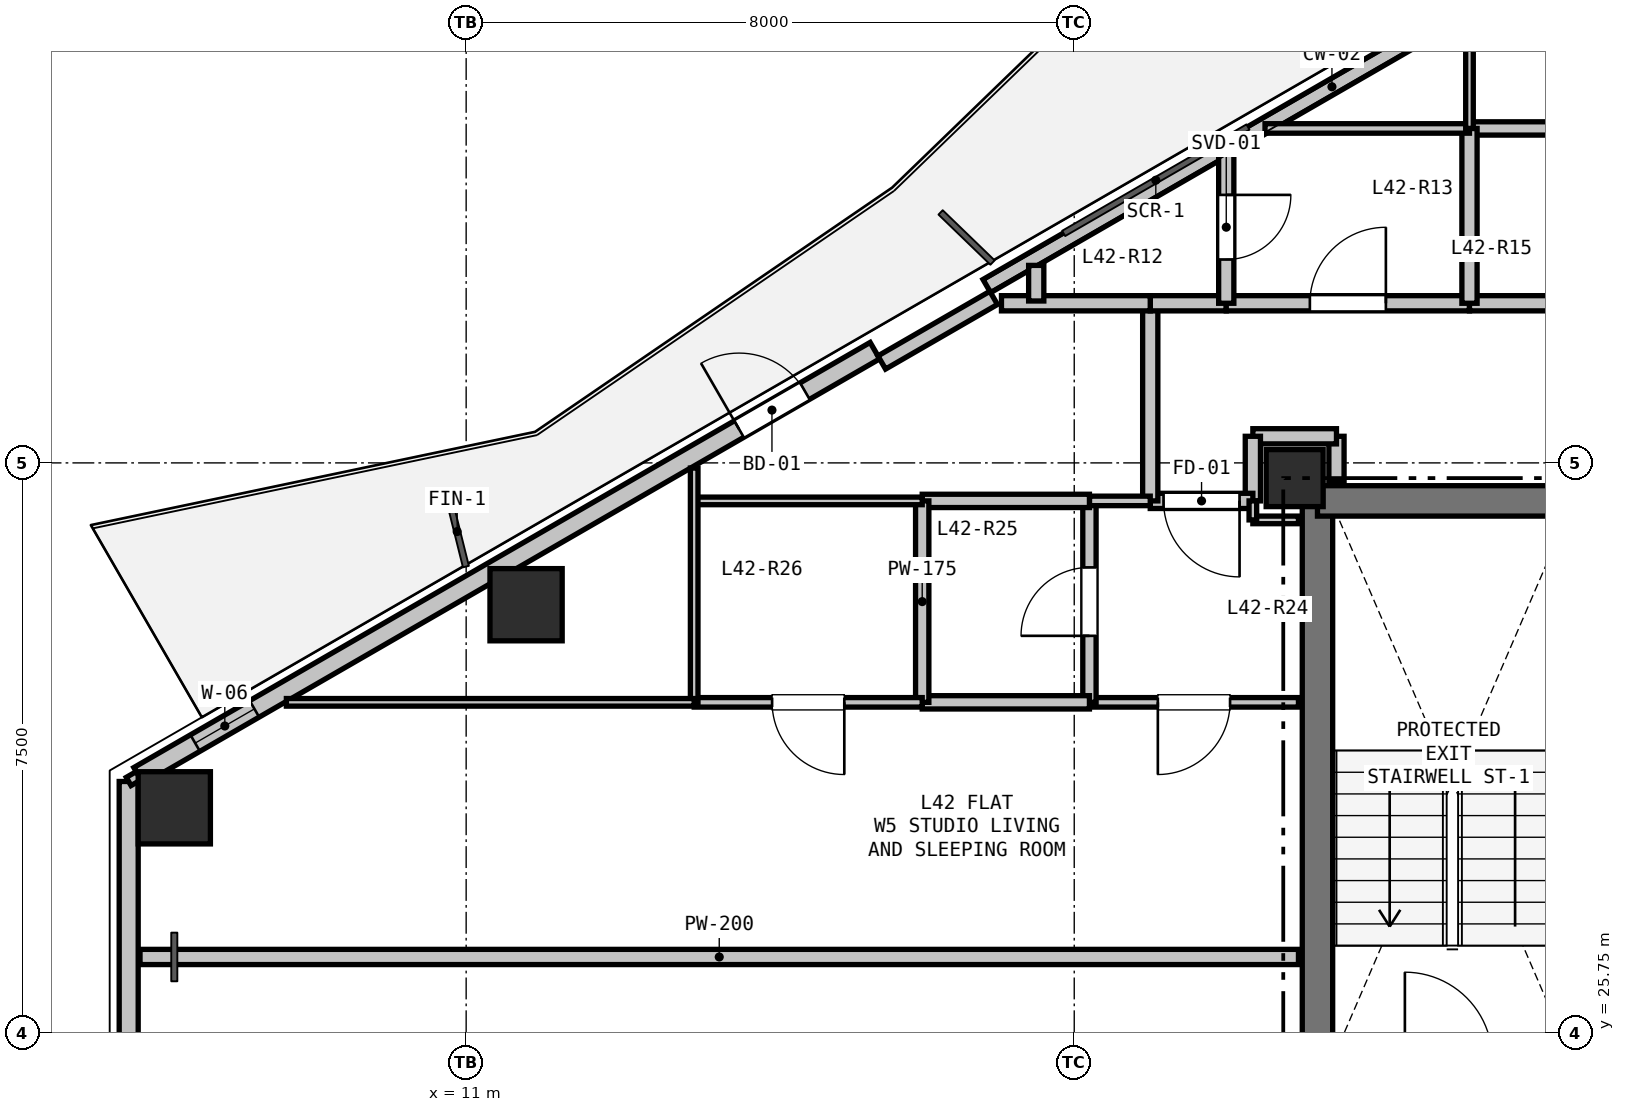
"""IFC4 building model, lengths in metres.
Left out: names, types, materials, properties, quantities, classifications, styles, units other than length and angle.
Written with IfcOpenShell. Run it as: python <this file> out.ifc"""

import sys

from ifc_helpers import new_model, si_unit, direction, frame, frame_2d, origin, origin_2d, place, context, subcontext, project, spatial, rectangle, hollow_rectangle, extrude, element, fill, save


model = new_model("IFC4")
c1 = context("Model", 3, precision=1e-05, world=origin(), true_north=direction((0.0, 1.0)))
c2 = subcontext(c1, "Body", "Model", "MODEL_VIEW")
j1 = project(units=[si_unit("LENGTHUNIT", "METRE"), si_unit("PLANEANGLEUNIT", "RADIAN")], contexts=[c1])
p1 = place(None, origin())
s1 = spatial("IfcSite", under=j1, at=p1, CompositionType="ELEMENT")
p2 = place(p1, origin())
s2 = spatial("IfcBuilding", under=s1, at=p2, CompositionType="ELEMENT")
p3 = place(p2, frame((0.0, 0.0, 150.9)))
s3 = spatial("IfcBuildingStorey", under=s2, at=p3, CompositionType="ELEMENT", Elevation=150.9)
p4 = place(p3, frame((21.9, 33.05, 0.0), z_axis=(0.0, 0.0, 1.0), x_axis=(1.0, 0.0, 0.0)))
e1 = element("IfcColumn", 1, at=p4, inside=s3, PredefinedType="COLUMN", context=c2, shape_type="SweptSolid", body=[
    extrude(rectangle(XDim=0.75, YDim=0.75, at=origin_2d()), origin(), (0.0, 0.0, 1.0), 3.3),
])
for number, where, z_axis, x_axis in (
    (2, (7.16, 28.712, 0.0), (0.0, 0.0, 1.0), (1.0, 0.0, 0.0)),
    (3, (11.788, 31.384, 0.0), (0.0, 0.0, 1.0), (1.0, 0.0, 0.0)),
):
    element("IfcColumn", number, at=place(p3, frame(where, z_axis=z_axis, x_axis=x_axis)), inside=s3, PredefinedType="COLUMN", context=c2, shape_type="SweptSolid", body=[
        extrude(hollow_rectangle(XDim=0.95, YDim=0.95, WallThickness=0.028, at=origin_2d()), origin(), (0.0, 0.0, 1.0), 3.3),
    ])
p5 = place(p3, frame((6.56, 24.441, 0.0), z_axis=(0.0, 0.0, 1.0), x_axis=(0.0, 1.0, 0.0)))
e4 = element("IfcWall", 4, at=p5, inside=s3, PredefinedType="SOLIDWALL", context=c2, shape_type="SweptSolid", body=[
    extrude(rectangle(XDim=4.617, YDim=0.25, at=frame_2d((2.309, 0.0))), origin(), (0.0, 0.0, 1.0), 2.68),
])
p6 = place(p3, frame((6.69, 29.134, 0.0), z_axis=(0.0, 0.0, 1.0), x_axis=(0.866027848477, 0.499995765644, 0.0)))
e5 = element("IfcWall", 5, at=p6, inside=s3, PredefinedType="SOLIDWALL", context=c2, shape_type="SweptSolid", body=[
    extrude(rectangle(XDim=11.186, YDim=0.25, at=frame_2d((5.593, 0.0))), origin(), (0.0, 0.0, 1.0), 2.68),
])
p7 = place(p6, frame((9.122, 0.0, 0.0)))
e6 = element("IfcOpeningElement", 6, at=p7, cuts=e5, PredefinedType="OPENING", context=c2, shape_type="SweptSolid", body=[
    extrude(rectangle(XDim=1.0, YDim=2.1, at=frame_2d((0.5, 1.05))), frame((0.0, 0.135, 0.0), z_axis=(0.0, -1.0, 0.0), x_axis=(1.0, 0.0, 0.0)), (0.0, 0.0, 1.0), 0.27),
])
p8 = place(p6, frame((0.86, 0.0, 0.9)))
e7 = element("IfcOpeningElement", 7, at=p8, cuts=e5, PredefinedType="OPENING", context=c2, shape_type="SweptSolid", body=[
    extrude(rectangle(XDim=0.9, YDim=1.4, at=frame_2d((0.45, 0.7))), frame((0.0, 0.135, 0.0), z_axis=(0.0, -1.0, 0.0), x_axis=(1.0, 0.0, 0.0)), (0.0, 0.0, 1.0), 0.27),
])
p9 = place(p3, frame((17.85, 35.577, 0.0), z_axis=(0.0, 0.0, 1.0), x_axis=(0.866026619769, 0.499997893847, 0.0)))
e8 = element("IfcWall", 8, at=p9, inside=s3, PredefinedType="PARAPET", context=c2, shape_type="SweptSolid", body=[
    extrude(rectangle(XDim=10.486, YDim=0.2, at=frame_2d((5.243, 0.0))), origin(), (0.0, 0.0, 1.0), 0.2),
])
p10 = place(p3, frame((16.468, 34.571, 0.0), z_axis=(0.0, 0.0, 1.0), x_axis=(0.865989465428, 0.500062241894, 0.0)))
e9 = element("IfcWall", 9, at=p10, inside=s3, PredefinedType="PARAPET", context=c2, shape_type="SweptSolid", body=[
    extrude(rectangle(XDim=1.7, YDim=0.2, at=frame_2d((0.85, 0.0))), origin(), (0.0, 0.0, 1.0), 2.68),
])
p11 = place(p3, frame((22.2, 25.4, 0.0), z_axis=(0.0, 0.0, 1.0), x_axis=(0.0, 1.0, 0.0)))
e10 = element("IfcWall", 10, at=p11, inside=s3, PredefinedType="SHEAR", context=c2, shape_type="SweptSolid", body=[
    extrude(rectangle(XDim=7.35, YDim=0.4, at=frame_2d((3.675, 0.0))), origin(), (0.0, 0.0, 1.0), 3.06),
])
p12 = place(p3, frame((22.2, 32.75, 0.0), z_axis=(0.0, 0.0, 1.0), x_axis=(1.0, 0.0, 0.0)))
e11 = element("IfcWall", 11, at=p12, inside=s3, PredefinedType="SHEAR", context=c2, shape_type="SweptSolid", body=[
    extrude(rectangle(XDim=3.45, YDim=0.4, at=frame_2d((1.725, 0.0))), origin(), (0.0, 0.0, 1.0), 3.06),
])
p13 = place(p3, frame((22.45, 33.0, 0.0), z_axis=(0.0, 0.0, 1.0), x_axis=(0.0, 1.0, 0.0)))
e12 = element("IfcWall", 12, at=p13, inside=s3, PredefinedType="PARTITIONING", context=c2, shape_type="SweptSolid", body=[
    extrude(rectangle(XDim=0.6, YDim=0.2, at=frame_2d((0.3, 0.0))), origin(), (0.0, 0.0, 1.0), 2.585),
])
p14 = place(p3, frame((22.45, 33.6, 0.0), z_axis=(0.0, 0.0, 1.0), x_axis=(-1.0, 0.0, 0.0)))
e13 = element("IfcWall", 13, at=p14, inside=s3, PredefinedType="PARTITIONING", context=c2, shape_type="SweptSolid", body=[
    extrude(rectangle(XDim=1.1, YDim=0.2, at=frame_2d((0.55, 0.0))), origin(), (0.0, 0.0, 1.0), 3.06),
])
p15 = place(p3, frame((21.35, 33.6, 0.0), z_axis=(0.0, 0.0, 1.0), x_axis=(0.0, -1.0, 0.0)))
e14 = element("IfcWall", 14, at=p15, inside=s3, PredefinedType="PARTITIONING", context=c2, shape_type="SweptSolid", body=[
    extrude(rectangle(XDim=0.85, YDim=0.2, at=frame_2d((0.425, 0.0))), origin(), (0.0, 0.0, 1.0), 2.433),
])
p16 = place(p3, frame((21.35, 32.75, 0.0), z_axis=(0.0, 0.0, 1.0), x_axis=(-1.0, 0.0, 0.0)))
e15 = element("IfcWall", 15, at=p16, inside=s3, PredefinedType="PARTITIONING", context=c2, shape_type="SweptSolid", body=[
    extrude(rectangle(XDim=1.35, YDim=0.2, at=frame_2d((0.675, 0.0))), origin(), (0.0, 0.0, 1.0), 2.433),
])
p17 = place(p16, frame((0.175, 0.0, 0.0)))
e16 = element("IfcOpeningElement", 16, at=p17, cuts=e15, PredefinedType="OPENING", context=c2, shape_type="SweptSolid", body=[
    extrude(rectangle(XDim=1.0, YDim=2.15, at=frame_2d((0.5, 1.075))), frame((0.0, 0.11, 0.0), z_axis=(0.0, -1.0, 0.0), x_axis=(1.0, 0.0, 0.0)), (0.0, 0.0, 1.0), 0.22),
])
p18 = place(p3, frame((20.0, 32.75, 0.0), z_axis=(0.0, 0.0, 1.0), x_axis=(0.0, 1.0, 0.0)))
e17 = element("IfcWall", 17, at=p18, inside=s3, PredefinedType="PARTITIONING", context=c2, shape_type="SweptSolid", body=[
    extrude(rectangle(XDim=2.6, YDim=0.2, at=frame_2d((1.3, 0.0))), origin(), (0.0, 0.0, 1.0), 2.433),
])
p19 = place(p3, frame((20.0, 35.35, 0.0), z_axis=(0.0, 0.0, 1.0), x_axis=(1.0, 0.0, 0.0)))
e18 = element("IfcWall", 18, at=p19, inside=s3, PredefinedType="PARTITIONING", context=c2, shape_type="SweptSolid", body=[
    extrude(rectangle(XDim=1.0, YDim=0.2, at=frame_2d((0.5, 0.0))), origin(), (0.0, 0.0, 1.0), 3.06),
])
p20 = place(p3, frame((21.0, 35.35, 0.0), z_axis=(0.0, 0.0, 1.0), x_axis=(1.0, 0.0, 0.0)))
e19 = element("IfcWall", 19, at=p20, inside=s3, PredefinedType="PARTITIONING", context=c2, shape_type="SweptSolid", body=[
    extrude(rectangle(XDim=3.2, YDim=0.2, at=frame_2d((1.6, 0.0))), origin(), (0.0, 0.0, 1.0), 3.06),
])
p21 = place(p20, frame((1.1, 0.0, 0.0)))
e20 = element("IfcOpeningElement", 20, at=p21, cuts=e19, PredefinedType="OPENING", context=c2, shape_type="SweptSolid", body=[
    extrude(rectangle(XDim=1.0, YDim=2.15, at=frame_2d((0.5, 1.075))), frame((0.0, 0.11, 0.0), z_axis=(0.0, -1.0, 0.0), x_axis=(1.0, 0.0, 0.0)), (0.0, 0.0, 1.0), 0.22),
])
p22 = place(p3, frame((24.2, 35.35, 0.0), z_axis=(0.0, 0.0, 1.0), x_axis=(1.0, 0.0, 0.0)))
e21 = element("IfcWall", 21, at=p22, inside=s3, PredefinedType="PARTITIONING", context=c2, shape_type="SweptSolid", body=[
    extrude(rectangle(XDim=2.2, YDim=0.2, at=frame_2d((1.1, 0.0))), origin(), (0.0, 0.0, 1.0), 3.06),
])
p23 = place(p3, frame((21.35, 32.5, 0.0), z_axis=(0.0, 0.0, 1.0), x_axis=(1.0, 0.0, 0.0)))
e22 = element("IfcWall", 22, at=p23, inside=s3, PredefinedType="PARTITIONING", context=c2, shape_type="SweptSolid", body=[
    extrude(rectangle(XDim=0.6, YDim=0.1, at=frame_2d((0.3, 0.0))), origin(), (0.0, 0.0, 1.0), 2.585),
])
p24 = place(p3, frame((21.95, 30.1, 0.0), z_axis=(0.0, 0.0, 1.0), x_axis=(-1.0, 0.0, 0.0)))
e23 = element("IfcWall", 23, at=p24, inside=s3, PredefinedType="PARTITIONING", context=c2, shape_type="SweptSolid", body=[
    extrude(rectangle(XDim=2.75, YDim=0.125, at=frame_2d((1.375, 0.0))), origin(), (0.0, 0.0, 1.0), 2.585),
])
p25 = place(p24, frame((0.9, 0.0, 0.0)))
e24 = element("IfcOpeningElement", 24, at=p25, cuts=e23, PredefinedType="OPENING", context=c2, shape_type="SweptSolid", body=[
    extrude(rectangle(XDim=0.95, YDim=2.1, at=frame_2d((0.475, 1.05))), frame((0.0, 0.073, 0.0), z_axis=(0.0, -1.0, 0.0), x_axis=(1.0, 0.0, 0.0)), (0.0, 0.0, 1.0), 0.145),
])
p26 = place(p3, frame((19.2, 30.1, 0.0), z_axis=(0.0, 0.0, 1.0), x_axis=(0.0, 1.0, 0.0)))
e25 = element("IfcWall", 25, at=p26, inside=s3, PredefinedType="PLUMBINGWALL", context=c2, shape_type="SweptSolid", body=[
    extrude(rectangle(XDim=2.65, YDim=0.175, at=frame_2d((1.325, 0.0))), origin(), (0.0, 0.0, 1.0), 2.433),
])
p27 = place(p26, frame((0.875, 0.0, 0.0)))
e26 = element("IfcOpeningElement", 26, at=p27, cuts=e25, PredefinedType="OPENING", context=c2, shape_type="SweptSolid", body=[
    extrude(rectangle(XDim=0.9, YDim=2.1, at=frame_2d((0.45, 1.05))), frame((0.0, 0.097, 0.0), z_axis=(0.0, -1.0, 0.0), x_axis=(1.0, 0.0, 0.0)), (0.0, 0.0, 1.0), 0.195),
])
p28 = place(p3, frame((19.2, 32.75, 0.0), z_axis=(0.0, 0.0, 1.0), x_axis=(1.0, 0.0, 0.0)))
e27 = element("IfcWall", 27, at=p28, inside=s3, PredefinedType="PARTITIONING", context=c2, shape_type="SweptSolid", body=[
    extrude(rectangle(XDim=0.8, YDim=0.125, at=frame_2d((0.4, 0.0))), origin(), (0.0, 0.0, 1.0), 2.433),
])
p29 = place(p3, frame((21.35, 32.75, 0.0), z_axis=(0.0, 0.0, 1.0), x_axis=(0.0, -1.0, 0.0)))
e28 = element("IfcWall", 28, at=p29, inside=s3, PredefinedType="PARTITIONING", context=c2, shape_type="SweptSolid", body=[
    extrude(rectangle(XDim=0.25, YDim=0.1, at=frame_2d((0.125, 0.0))), origin(), (0.0, 0.0, 1.0), 3.06),
])
p30 = place(p3, frame((24.2, 37.65, 0.0), z_axis=(0.0, 0.0, 1.0), x_axis=(1.0, 0.0, 0.0)))
e29 = element("IfcWall", 29, at=p30, inside=s3, PredefinedType="PLUMBINGWALL", context=c2, shape_type="SweptSolid", body=[
    extrude(rectangle(XDim=2.2, YDim=0.175, at=frame_2d((1.1, 0.0))), origin(), (0.0, 0.0, 1.0), 3.06),
])
p31 = place(p3, frame((24.2, 35.35, 0.0), z_axis=(0.0, 0.0, 1.0), x_axis=(0.0, 1.0, 0.0)))
e30 = element("IfcWall", 30, at=p31, inside=s3, PredefinedType="PARTITIONING", context=c2, shape_type="SweptSolid", body=[
    extrude(rectangle(XDim=2.3, YDim=0.2, at=frame_2d((1.15, 0.0))), origin(), (0.0, 0.0, 1.0), 3.06),
])
p32 = place(p3, frame((17.0, 32.75, 0.0), z_axis=(0.0, 0.0, 1.0), x_axis=(1.0, 0.0, 0.0)))
e31 = element("IfcWall", 31, at=p32, inside=s3, PredefinedType="PLUMBINGWALL", context=c2, shape_type="SweptSolid", body=[
    extrude(rectangle(XDim=2.2, YDim=0.175, at=frame_2d((1.1, 0.0))), origin(), (0.0, 0.0, 1.0), 2.433),
])
p33 = place(p3, frame((19.2, 30.1, 0.0), z_axis=(0.0, 0.0, 1.0), x_axis=(-1.0, 0.0, 0.0)))
e32 = element("IfcWall", 32, at=p33, inside=s3, PredefinedType="PLUMBINGWALL", context=c2, shape_type="SweptSolid", body=[
    extrude(rectangle(XDim=2.2, YDim=0.175, at=frame_2d((1.1, 0.0))), origin(), (0.0, 0.0, 1.0), 3.06),
])
p34 = place(p3, frame((17.0, 30.1, 0.0), z_axis=(0.0, 0.0, 1.0), x_axis=(0.0, 1.0, 0.0)))
e33 = element("IfcWall", 33, at=p34, inside=s3, PredefinedType="PLUMBINGWALL", context=c2, shape_type="SweptSolid", body=[
    extrude(rectangle(XDim=2.65, YDim=0.175, at=frame_2d((1.325, 0.0))), origin(), (0.0, 0.0, 1.0), 2.433),
])
p35 = place(p3, frame((14.0, 32.75, 0.0), z_axis=(0.0, 0.0, 1.0), x_axis=(1.0, 0.0, 0.0)))
e34 = element("IfcWall", 34, at=p35, inside=s3, PredefinedType="PARTITIONING", context=c2, shape_type="SweptSolid", body=[
    extrude(rectangle(XDim=3.0, YDim=0.1, at=frame_2d((1.5, 0.0))), origin(), (0.0, 0.0, 1.0), 2.365),
])
p36 = place(p3, frame((17.0, 30.1, 0.0), z_axis=(0.0, 0.0, 1.0), x_axis=(-1.0, 0.0, 0.0)))
e35 = element("IfcWall", 35, at=p36, inside=s3, PredefinedType="PARTITIONING", context=c2, shape_type="SweptSolid", body=[
    extrude(rectangle(XDim=3.0, YDim=0.125, at=frame_2d((1.5, 0.0))), origin(), (0.0, 0.0, 1.0), 3.06),
])
p37 = place(p36, frame((1.025, 0.0, 0.0)))
e36 = element("IfcOpeningElement", 36, at=p37, cuts=e35, PredefinedType="OPENING", context=c2, shape_type="SweptSolid", body=[
    extrude(rectangle(XDim=0.95, YDim=2.1, at=frame_2d((0.475, 1.05))), frame((0.0, 0.073, 0.0), z_axis=(0.0, -1.0, 0.0), x_axis=(1.0, 0.0, 0.0)), (0.0, 0.0, 1.0), 0.145),
])
p38 = place(p3, frame((14.0, 30.1, 0.0), z_axis=(0.0, 0.0, 1.0), x_axis=(0.0, 1.0, 0.0)))
e37 = element("IfcWall", 37, at=p38, inside=s3, PredefinedType="PARTITIONING", context=c2, shape_type="SweptSolid", body=[
    extrude(rectangle(XDim=3.082, YDim=0.1, at=frame_2d((1.541, 0.0))), origin(), (0.0, 0.0, 1.0), 2.365),
])
p39 = place(p3, frame((6.709, 26.75, 0.0), z_axis=(0.0, 0.0, 1.0), x_axis=(1.0, 0.0, 0.0)))
e38 = element("IfcWall", 38, at=p39, inside=s3, PredefinedType="PARTITIONING", context=c2, shape_type="SweptSolid", body=[
    extrude(rectangle(XDim=15.241, YDim=0.2, at=frame_2d((7.62, 0.0))), origin(), (0.0, 0.0, 1.0), 2.585),
])
p40 = place(p3, frame((20.0, 35.35, 0.0), z_axis=(0.0, 0.0, 1.0), x_axis=(-1.0, 0.0, 0.0)))
e39 = element("IfcWall", 39, at=p40, inside=s3, PredefinedType="PARTITIONING", context=c2, shape_type="SweptSolid", body=[
    extrude(rectangle(XDim=1.958, YDim=0.2, at=frame_2d((0.979, 0.0))), origin(), (0.0, 0.0, 1.0), 2.365),
])
p41 = place(p3, frame((18.5, 35.38, 0.0), z_axis=(0.0, 0.0, 1.0), x_axis=(0.0, 1.0, 0.0)))
e40 = element("IfcWall", 40, at=p41, inside=s3, PredefinedType="PARTITIONING", context=c2, shape_type="SweptSolid", body=[
    extrude(rectangle(XDim=0.468, YDim=0.2, at=frame_2d((0.234, 0.0))), origin(), (0.0, 0.0, 1.0), 2.365),
])
p42 = place(p3, frame((21.0, 37.352, 0.0), z_axis=(0.0, 0.0, 1.0), x_axis=(0.0, -1.0, 0.0)))
e41 = element("IfcWall", 41, at=p42, inside=s3, PredefinedType="PARTITIONING", context=c2, shape_type="SweptSolid", body=[
    extrude(rectangle(XDim=2.001, YDim=0.2, at=frame_2d((1.001, 0.0))), origin(), (0.0, 0.0, 1.0), 2.365),
])
p43 = place(p42, frame((0.576, 0.0, 0.0)))
e42 = element("IfcOpeningElement", 42, at=p43, cuts=e41, PredefinedType="OPENING", context=c2, shape_type="SweptSolid", body=[
    extrude(rectangle(XDim=0.85, YDim=2.1, at=frame_2d((0.425, 1.05))), frame((0.0, 0.11, 0.0), z_axis=(0.0, -1.0, 0.0), x_axis=(1.0, 0.0, 0.0)), (0.0, 0.0, 1.0), 0.22),
])
p44 = place(p3, frame((21.51, 37.65, 0.0), z_axis=(0.0, 0.0, 1.0), x_axis=(1.0, 0.0, 0.0)))
e43 = element("IfcWall", 43, at=p44, inside=s3, PredefinedType="PARTITIONING", context=c2, shape_type="SweptSolid", body=[
    extrude(rectangle(XDim=2.69, YDim=0.125, at=frame_2d((1.345, 0.0))), origin(), (0.0, 0.0, 1.0), 2.365),
])
p45 = place(p3, frame((24.2, 37.65, 0.0), z_axis=(0.0, 0.0, 1.0), x_axis=(0.0, 1.0, 0.0)))
e44 = element("IfcWall", 44, at=p45, inside=s3, PredefinedType="PARTITIONING", context=c2, shape_type="SweptSolid", body=[
    extrude(rectangle(XDim=1.549, YDim=0.1, at=frame_2d((0.774, 0.0))), origin(), (0.0, 0.0, 1.0), 2.365),
])
p46 = place(p3, frame((8.635, 30.1, 0.0), z_axis=(0.0, 0.0, 1.0), x_axis=(1.0, 0.0, 0.0)))
e45 = element("IfcWall", 45, at=p46, inside=s3, PredefinedType="PARTITIONING", context=c2, shape_type="SweptSolid", body=[
    extrude(rectangle(XDim=5.365, YDim=0.1, at=frame_2d((2.683, 0.0))), origin(), (0.0, 0.0, 1.0), 2.725),
])
p47 = place(p3, frame((6.56, 29.059, 0.0), z_axis=(0.0, 0.0, 1.0), x_axis=(0.866131372301, 0.499816412211, 0.0)))
e46 = element("IfcWall", 46, at=p47, inside=s3, PredefinedType="PARTITIONING", context=c2, shape_type="SweptSolid", body=[
    extrude(rectangle(XDim=0.15, YDim=0.125, at=frame_2d((0.075, 0.0))), origin(), (0.0, 0.0, 1.0), 3.06),
])
p48 = place(p7, origin())
e47 = element("IfcDoor", 47, at=p48, inside=s3, OperationType="SINGLE_SWING_LEFT", PredefinedType="DOOR", context=c2, shape_type="SweptSolid", body=[
    extrude(rectangle(XDim=1.0, YDim=2.1, at=frame_2d((0.5, 1.05))), frame((0.0, 0.025, 0.0), z_axis=(0.0, -1.0, 0.0), x_axis=(1.0, 0.0, 0.0)), (0.0, 0.0, 1.0), 0.05),
])
fill(e6, e47)
p49 = place(p8, origin())
e48 = element("IfcWindow", 48, at=p49, inside=s3, PartitioningType="SINGLE_PANEL", PredefinedType="WINDOW", context=c2, shape_type="SweptSolid", body=[
    extrude(rectangle(XDim=0.9, YDim=1.4, at=frame_2d((0.45, 0.7))), frame((0.0, 0.03, 0.0), z_axis=(0.0, -1.0, 0.0), x_axis=(1.0, 0.0, 0.0)), (0.0, 0.0, 1.0), 0.06),
])
fill(e7, e48)
p50 = place(p17, origin())
e49 = element("IfcDoor", 49, at=p50, inside=s3, OperationType="SINGLE_SWING_LEFT", PredefinedType="DOOR", context=c2, shape_type="SweptSolid", body=[
    extrude(rectangle(XDim=1.0, YDim=2.15, at=frame_2d((0.5, 1.075))), frame((0.0, 0.025, 0.0), z_axis=(0.0, -1.0, 0.0), x_axis=(1.0, 0.0, 0.0)), (0.0, 0.0, 1.0), 0.05),
])
fill(e16, e49)
p51 = place(p21, origin())
e50 = element("IfcDoor", 50, at=p51, inside=s3, OperationType="SINGLE_SWING_RIGHT", PredefinedType="DOOR", context=c2, shape_type="SweptSolid", body=[
    extrude(rectangle(XDim=1.0, YDim=2.15, at=frame_2d((0.5, 1.075))), frame((0.0, 0.025, 0.0), z_axis=(0.0, -1.0, 0.0), x_axis=(1.0, 0.0, 0.0)), (0.0, 0.0, 1.0), 0.05),
])
fill(e20, e50)
p52 = place(p27, origin())
e51 = element("IfcDoor", 51, at=p52, inside=s3, OperationType="SINGLE_SWING_LEFT", PredefinedType="DOOR", context=c2, shape_type="SweptSolid", body=[
    extrude(rectangle(XDim=0.9, YDim=2.1, at=frame_2d((0.45, 1.05))), frame((0.0, 0.025, 0.0), z_axis=(0.0, -1.0, 0.0), x_axis=(1.0, 0.0, 0.0)), (0.0, 0.0, 1.0), 0.05),
])
fill(e26, e51)
p53 = place(p25, origin())
e52 = element("IfcDoor", 52, at=p53, inside=s3, OperationType="SINGLE_SWING_RIGHT", PredefinedType="DOOR", context=c2, shape_type="SweptSolid", body=[
    extrude(rectangle(XDim=0.95, YDim=2.1, at=frame_2d((0.475, 1.05))), frame((0.0, 0.025, 0.0), z_axis=(0.0, -1.0, 0.0), x_axis=(1.0, 0.0, 0.0)), (0.0, 0.0, 1.0), 0.05),
])
fill(e24, e52)
p54 = place(p37, origin())
e53 = element("IfcDoor", 53, at=p54, inside=s3, OperationType="SINGLE_SWING_LEFT", PredefinedType="DOOR", context=c2, shape_type="SweptSolid", body=[
    extrude(rectangle(XDim=0.95, YDim=2.1, at=frame_2d((0.475, 1.05))), frame((0.0, 0.025, 0.0), z_axis=(0.0, -1.0, 0.0), x_axis=(1.0, 0.0, 0.0)), (0.0, 0.0, 1.0), 0.05),
])
fill(e36, e53)
p55 = place(p43, origin())
e54 = element("IfcDoor", 54, at=p55, inside=s3, OperationType="SINGLE_SWING_LEFT", PredefinedType="DOOR", context=c2, shape_type="SweptSolid", body=[
    extrude(rectangle(XDim=0.85, YDim=2.1, at=frame_2d((0.425, 1.05))), frame((0.0, 0.025, 0.0), z_axis=(0.0, -1.0, 0.0), x_axis=(1.0, 0.0, 0.0)), (0.0, 0.0, 1.0), 0.05),
])
fill(e42, e54)
save(model, sys.argv[1])
